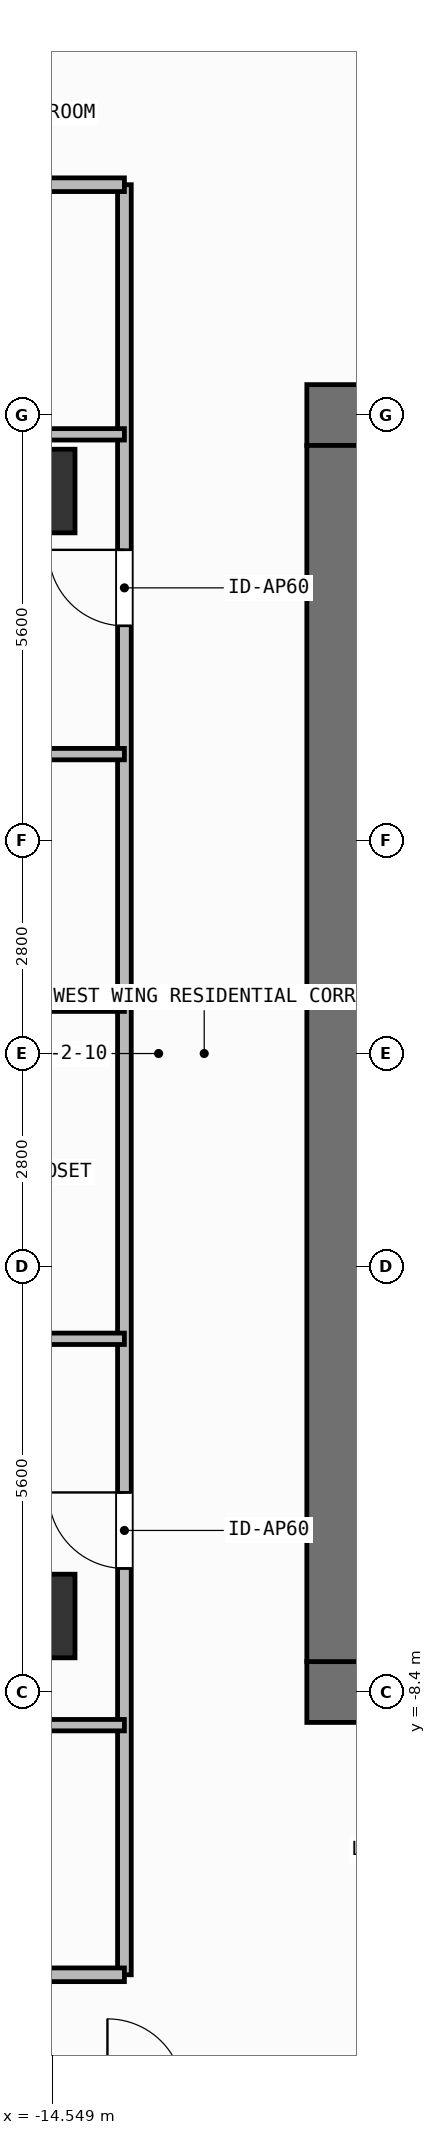
"""IFC4 building model, lengths in metres.
Left out: names, types, materials, properties, quantities, classifications, styles, units other than length and angle.
Written with IfcOpenShell. Run it as: python <this file> out.ifc"""

import sys

from ifc_helpers import new_model, si_unit, direction, frame, frame_2d, origin, origin_2d, place, context, subcontext, project, spatial, rectangle, extrude, element, fill, save


model = new_model("IFC4")
c1 = context("Model", 3, precision=1e-05, world=origin(), true_north=direction((0.0, 1.0)))
c2 = subcontext(c1, "Body", "Model", "MODEL_VIEW")
j1 = project(units=[si_unit("LENGTHUNIT", "METRE"), si_unit("PLANEANGLEUNIT", "RADIAN")], contexts=[c1])
p1 = place(None, origin())
s1 = spatial("IfcSite", under=j1, at=p1, CompositionType="ELEMENT")
p2 = place(p1, origin())
s2 = spatial("IfcBuilding", under=s1, at=p2, CompositionType="ELEMENT")
p3 = place(p2, frame((0.0, 0.0, 199.2)))
s3 = spatial("IfcBuildingStorey", under=s2, at=p3, CompositionType="ELEMENT", Elevation=199.2)
for number, where, z_axis, x_axis in (
    (1, (-11.2, -8.4, 0.0), (0.0, 0.0, 1.0), (1.0, 0.0, 0.0)),
    (2, (-11.2, 8.4, 0.0), (0.0, 0.0, 1.0), (1.0, 0.0, 0.0)),
):
    element("IfcWall", number, at=place(p3, frame(where, z_axis=z_axis, x_axis=x_axis)), inside=s3, PredefinedType="SHEAR", context=c2, shape_type="SweptSolid", body=[
        extrude(rectangle(XDim=1.5, YDim=0.8, at=frame_2d((0.75, 0.0))), origin(), (0.0, 0.0, 1.0), 3.9),
    ])
p4 = place(p3, frame((-10.8, -8.0, 0.0), z_axis=(0.0, 0.0, 1.0), x_axis=(0.0, 1.0, 0.0)))
e3 = element("IfcWall", 3, at=p4, inside=s3, PredefinedType="SHEAR", context=c2, shape_type="SweptSolid", body=[
    extrude(rectangle(XDim=16.0, YDim=0.8, at=frame_2d((8.0, 0.0))), origin(), (0.0, 0.0, 1.0), 3.9),
])
for number, where, z_axis, x_axis in (
    (4, (-14.8, -7.4, 0.0), (0.0, 0.0, 1.0), (1.0, 0.0, 0.0)),
    (5, (-14.8, 7.4, 0.0), (0.0, 0.0, 1.0), (1.0, 0.0, 0.0)),
):
    element("IfcColumn", number, at=place(p3, frame(where, z_axis=z_axis, x_axis=x_axis)), inside=s3, PredefinedType="COLUMN", context=c2, shape_type="SweptSolid", body=[
        extrude(rectangle(XDim=1.1, YDim=1.1, at=origin_2d()), origin(), (0.0, 0.0, 1.0), 3.9),
    ])
p5 = place(p3, frame((-13.6, -12.12, 0.0), z_axis=(0.0, 0.0, 1.0), x_axis=(0.0, 1.0, 0.0)))
e6 = element("IfcWall", 6, at=p5, inside=s3, PredefinedType="PARTITIONING", context=c2, shape_type="SweptSolid", body=[
    extrude(rectangle(XDim=12.764, YDim=0.18, at=frame_2d((6.382, 0.0))), origin(), (0.0, 0.0, 1.0), 3.68),
])
p6 = place(p5, frame((5.346, 0.0, 0.0)))
e7 = element("IfcOpeningElement", 7, at=p6, cuts=e6, PredefinedType="OPENING", context=c2, shape_type="SweptSolid", body=[
    extrude(rectangle(XDim=1.0, YDim=2.2, at=frame_2d((0.5, 1.1))), frame((0.0, 0.1, 0.0), z_axis=(0.0, -1.0, 0.0), x_axis=(1.0, 0.0, 0.0)), (0.0, 0.0, 1.0), 0.2),
])
p7 = place(p3, frame((-17.83, -3.753, 0.0), z_axis=(0.0, 0.0, 1.0), x_axis=(1.0, 0.0, 0.0)))
e8 = element("IfcWall", 8, at=p7, inside=s3, PredefinedType="PARTITIONING", context=c2, shape_type="SweptSolid", body=[
    extrude(rectangle(XDim=4.23, YDim=0.15, at=frame_2d((2.115, 0.0))), origin(), (0.0, 0.0, 1.0), 3.68),
])
p8 = place(p7, frame((1.6, 0.0, 0.0)))
e9 = element("IfcOpeningElement", 9, at=p8, cuts=e8, PredefinedType="OPENING", context=c2, shape_type="SweptSolid", body=[
    extrude(rectangle(XDim=0.85, YDim=2.1, at=frame_2d((0.425, 1.05))), frame((0.0, 0.085, 0.0), z_axis=(0.0, -1.0, 0.0), x_axis=(1.0, 0.0, 0.0)), (0.0, 0.0, 1.0), 0.17),
])
p9 = place(p3, frame((-20.769, -8.836, 0.0), z_axis=(0.0, 0.0, 1.0), x_axis=(1.0, 0.0, 0.0)))
e10 = element("IfcWall", 10, at=p9, inside=s3, PredefinedType="PARTITIONING", context=c2, shape_type="SweptSolid", body=[
    extrude(rectangle(XDim=7.169, YDim=0.15, at=frame_2d((3.584, 0.0))), origin(), (0.0, 0.0, 1.0), 3.68),
])
p10 = place(p9, frame((3.159, 0.0, 0.0)))
e11 = element("IfcOpeningElement", 11, at=p10, cuts=e10, PredefinedType="OPENING", context=c2, shape_type="SweptSolid", body=[
    extrude(rectangle(XDim=0.85, YDim=2.1, at=frame_2d((0.425, 1.05))), frame((0.0, 0.085, 0.0), z_axis=(0.0, -1.0, 0.0), x_axis=(1.0, 0.0, 0.0)), (0.0, 0.0, 1.0), 0.17),
])
p11 = place(p3, frame((-13.6, 0.644, 0.0), z_axis=(0.0, 0.0, 1.0), x_axis=(0.0, 1.0, 0.0)))
e12 = element("IfcWall", 12, at=p11, inside=s3, PredefinedType="PARTITIONING", context=c2, shape_type="SweptSolid", body=[
    extrude(rectangle(XDim=10.786, YDim=0.18, at=frame_2d((5.393, 0.0))), origin(), (0.0, 0.0, 1.0), 3.68),
])
p12 = place(p11, frame((4.982, 0.0, 0.0)))
e13 = element("IfcOpeningElement", 13, at=p12, cuts=e12, PredefinedType="OPENING", context=c2, shape_type="SweptSolid", body=[
    extrude(rectangle(XDim=1.0, YDim=2.2, at=frame_2d((0.5, 1.1))), frame((0.0, 0.1, 0.0), z_axis=(0.0, -1.0, 0.0), x_axis=(1.0, 0.0, 0.0)), (0.0, 0.0, 1.0), 0.2),
])
p13 = place(p3, frame((-20.769, 8.146, 0.0), z_axis=(0.0, 0.0, 1.0), x_axis=(1.0, 0.0, 0.0)))
e14 = element("IfcWall", 14, at=p13, inside=s3, PredefinedType="PARTITIONING", context=c2, shape_type="SweptSolid", body=[
    extrude(rectangle(XDim=7.169, YDim=0.15, at=frame_2d((3.584, 0.0))), origin(), (0.0, 0.0, 1.0), 3.68),
])
p14 = place(p13, frame((3.159, 0.0, 0.0)))
e15 = element("IfcOpeningElement", 15, at=p14, cuts=e14, PredefinedType="OPENING", context=c2, shape_type="SweptSolid", body=[
    extrude(rectangle(XDim=0.85, YDim=2.1, at=frame_2d((0.425, 1.05))), frame((0.0, 0.085, 0.0), z_axis=(0.0, -1.0, 0.0), x_axis=(1.0, 0.0, 0.0)), (0.0, 0.0, 1.0), 0.17),
])
p15 = place(p3, frame((-20.769, 3.939, 0.0), z_axis=(0.0, 0.0, 1.0), x_axis=(1.0, 0.0, 0.0)))
e16 = element("IfcWall", 16, at=p15, inside=s3, PredefinedType="PARTITIONING", context=c2, shape_type="SweptSolid", body=[
    extrude(rectangle(XDim=7.169, YDim=0.15, at=frame_2d((3.584, 0.0))), origin(), (0.0, 0.0, 1.0), 3.68),
])
p16 = place(p15, frame((3.159, 0.0, 0.0)))
e17 = element("IfcOpeningElement", 17, at=p16, cuts=e16, PredefinedType="OPENING", context=c2, shape_type="SweptSolid", body=[
    extrude(rectangle(XDim=0.85, YDim=2.1, at=frame_2d((0.425, 1.05))), frame((0.0, 0.085, 0.0), z_axis=(0.0, -1.0, 0.0), x_axis=(1.0, 0.0, 0.0)), (0.0, 0.0, 1.0), 0.17),
])
for number, where, z_axis, x_axis in (
    (18, (-24.13, 0.644, 0.0), (0.0, 0.0, 1.0), (1.0, 0.0, 0.0)),
    (19, (-24.13, -12.12, 0.0), (0.0, 0.0, 1.0), (1.0, 0.0, 0.0)),
):
    element("IfcWall", number, at=place(p3, frame(where, z_axis=z_axis, x_axis=x_axis)), inside=s3, PredefinedType="PARTITIONING", context=c2, shape_type="SweptSolid", body=[
        extrude(rectangle(XDim=10.53, YDim=0.18, at=frame_2d((5.265, 0.0))), origin(), (0.0, 0.0, 1.0), 3.68),
    ])
p17 = place(p3, frame((-24.13, 11.43, 0.0), z_axis=(0.0, 0.0, 1.0), x_axis=(1.0, 0.0, 0.0)))
e20 = element("IfcWall", 20, at=p17, inside=s3, PredefinedType="PARTITIONING", context=c2, shape_type="SweptSolid", body=[
    extrude(rectangle(XDim=10.53, YDim=0.18, at=frame_2d((5.265, 0.0))), origin(), (0.0, 0.0, 1.0), 3.42),
])
p18 = place(p6, origin())
e21 = element("IfcDoor", 21, at=p18, inside=s3, OperationType="SINGLE_SWING_RIGHT", PredefinedType="DOOR", context=c2, shape_type="SweptSolid", body=[
    extrude(rectangle(XDim=1.0, YDim=2.2, at=frame_2d((0.5, 1.1))), frame((0.0, 0.025, 0.0), z_axis=(0.0, -1.0, 0.0), x_axis=(1.0, 0.0, 0.0)), (0.0, 0.0, 1.0), 0.05),
])
fill(e7, e21)
p19 = place(p12, origin())
e22 = element("IfcDoor", 22, at=p19, inside=s3, OperationType="SINGLE_SWING_RIGHT", PredefinedType="DOOR", context=c2, shape_type="SweptSolid", body=[
    extrude(rectangle(XDim=1.0, YDim=2.2, at=frame_2d((0.5, 1.1))), frame((0.0, 0.025, 0.0), z_axis=(0.0, -1.0, 0.0), x_axis=(1.0, 0.0, 0.0)), (0.0, 0.0, 1.0), 0.05),
])
fill(e13, e22)
save(model, sys.argv[1])
